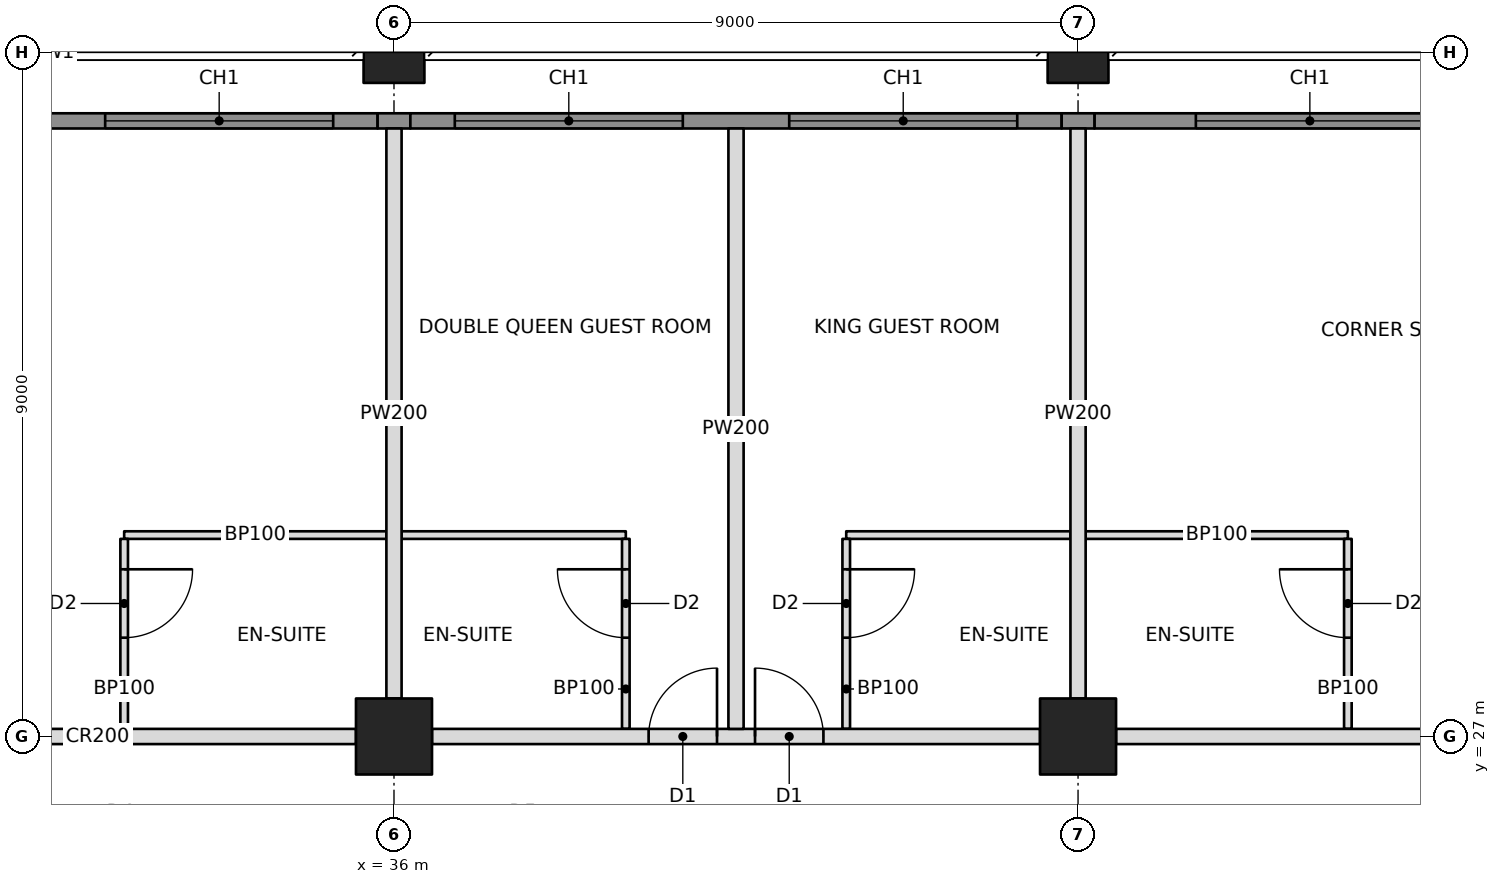
"""IFC4 building model, lengths in metres.
Left out: names, types, materials, properties, quantities, classifications, styles, units other than length and angle.
Written with IfcOpenShell. Run it as: python <this file> out.ifc"""

import sys

from ifc_helpers import new_model, si_unit, direction, frame, frame_2d, origin, origin_2d, place, context, subcontext, project, spatial, rectangle, hollow_rectangle, extrude, element, fill, save


model = new_model("IFC4")
c1 = context("Model", 3, precision=1e-05, world=origin(), true_north=direction((0.0, 1.0)))
c2 = subcontext(c1, "Body", "Model", "MODEL_VIEW")
j1 = project(units=[si_unit("LENGTHUNIT", "METRE"), si_unit("PLANEANGLEUNIT", "RADIAN")], contexts=[c1])
p1 = place(None, origin())
s1 = spatial("IfcSite", under=j1, at=p1, CompositionType="ELEMENT")
p2 = place(p1, origin())
s2 = spatial("IfcBuilding", under=s1, at=p2, CompositionType="ELEMENT")
p3 = place(p2, frame((0.0, 0.0, 85.8)))
s3 = spatial("IfcBuildingStorey", under=s2, at=p3, CompositionType="ELEMENT", Elevation=85.8)
p4 = place(p3, frame((36.0, 27.0, 0.0), z_axis=(0.0, 0.0, 1.0), x_axis=(1.0, 0.0, 0.0)))
e1 = element("IfcColumn", 1, at=p4, inside=s3, PredefinedType="COLUMN", context=c2, shape_type="SweptSolid", body=[
    extrude(hollow_rectangle(XDim=1.0, YDim=1.0, WallThickness=0.1, at=origin_2d()), origin(), (0.0, 0.0, 1.0), 3.4),
])
p5 = place(p3, frame((36.0, 36.0, 0.0), z_axis=(0.0, 0.0, 1.0), x_axis=(1.0, 0.0, 0.0)))
e2 = element("IfcColumn", 2, at=p5, inside=s3, PredefinedType="COLUMN", context=c2, shape_type="SweptSolid", body=[
    extrude(hollow_rectangle(XDim=0.8, YDim=0.8, WallThickness=0.07, at=origin_2d()), origin(), (0.0, 0.0, 1.0), 3.4),
])
p6 = place(p3, frame((45.0, 27.0, 0.0), z_axis=(0.0, 0.0, 1.0), x_axis=(0.0, 1.0, 0.0)))
e3 = element("IfcColumn", 3, at=p6, inside=s3, PredefinedType="COLUMN", context=c2, shape_type="SweptSolid", body=[
    extrude(hollow_rectangle(XDim=1.0, YDim=1.0, WallThickness=0.1, at=origin_2d()), origin(), (0.0, 0.0, 1.0), 3.4),
])
p7 = place(p3, frame((45.0, 36.0, 0.0), z_axis=(0.0, 0.0, 1.0), x_axis=(1.0, 0.0, 0.0)))
e4 = element("IfcColumn", 4, at=p7, inside=s3, PredefinedType="COLUMN", context=c2, shape_type="SweptSolid", body=[
    extrude(hollow_rectangle(XDim=0.8, YDim=0.8, WallThickness=0.07, at=origin_2d()), origin(), (0.0, 0.0, 1.0), 3.4),
])
p8 = place(p3, frame((27.5, 27.0, 0.0), z_axis=(0.0, 0.0, 1.0), x_axis=(1.0, 0.0, 0.0)))
e5 = element("IfcWall", 5, at=p8, inside=s3, PredefinedType="PARTITIONING", context=c2, shape_type="SweptSolid", body=[
    extrude(rectangle(XDim=8.0, YDim=0.2, at=frame_2d((4.0, 0.0))), origin(), (0.0, 0.0, 1.0), 2.21),
])
p9 = place(p8, frame((0.15, 0.0, 0.0)))
e6 = element("IfcOpeningElement", 6, at=p9, cuts=e5, PredefinedType="OPENING", context=c2, shape_type="SweptSolid", body=[
    extrude(rectangle(XDim=0.9, YDim=2.1, at=frame_2d((0.45, 1.05))), frame((0.0, 0.11, 0.0), z_axis=(0.0, -1.0, 0.0), x_axis=(1.0, 0.0, 0.0)), (0.0, 0.0, 1.0), 0.22),
])
p10 = place(p3, frame((36.5, 27.0, 0.0), z_axis=(0.0, 0.0, 1.0), x_axis=(1.0, 0.0, 0.0)))
e7 = element("IfcWall", 7, at=p10, inside=s3, PredefinedType="PARTITIONING", context=c2, shape_type="SweptSolid", body=[
    extrude(rectangle(XDim=8.0, YDim=0.2, at=frame_2d((4.0, 0.0))), origin(), (0.0, 0.0, 1.0), 2.21),
])
p11 = place(p10, frame((2.85, 0.0, 0.0)))
e8 = element("IfcOpeningElement", 8, at=p11, cuts=e7, PredefinedType="OPENING", context=c2, shape_type="SweptSolid", body=[
    extrude(rectangle(XDim=0.9, YDim=2.1, at=frame_2d((0.45, 1.05))), frame((0.0, 0.11, 0.0), z_axis=(0.0, -1.0, 0.0), x_axis=(1.0, 0.0, 0.0)), (0.0, 0.0, 1.0), 0.22),
])
p12 = place(p10, frame((4.25, 0.0, 0.0)))
e9 = element("IfcOpeningElement", 9, at=p12, cuts=e7, PredefinedType="OPENING", context=c2, shape_type="SweptSolid", body=[
    extrude(rectangle(XDim=0.9, YDim=2.1, at=frame_2d((0.45, 1.05))), frame((0.0, 0.11, 0.0), z_axis=(0.0, -1.0, 0.0), x_axis=(1.0, 0.0, 0.0)), (0.0, 0.0, 1.0), 0.22),
])
p13 = place(p3, frame((45.5, 27.0, 0.0), z_axis=(0.0, 0.0, 1.0), x_axis=(1.0, 0.0, 0.0)))
e10 = element("IfcWall", 10, at=p13, inside=s3, PredefinedType="PARTITIONING", context=c2, shape_type="SweptSolid", body=[
    extrude(rectangle(XDim=7.5, YDim=0.2, at=frame_2d((3.75, 0.0))), origin(), (0.0, 0.0, 1.0), 2.21),
])
p14 = place(p13, frame((6.35, 0.0, 0.0)))
e11 = element("IfcOpeningElement", 11, at=p14, cuts=e10, PredefinedType="OPENING", context=c2, shape_type="SweptSolid", body=[
    extrude(rectangle(XDim=0.9, YDim=2.1, at=frame_2d((0.45, 1.05))), frame((0.0, 0.11, 0.0), z_axis=(0.0, -1.0, 0.0), x_axis=(1.0, 0.0, 0.0)), (0.0, 0.0, 1.0), 0.22),
])
p15 = place(p3, frame((36.0, 27.5, 0.0), z_axis=(0.0, 0.0, 1.0), x_axis=(0.0, 1.0, 0.0)))
e12 = element("IfcWall", 12, at=p15, inside=s3, PredefinedType="PARTITIONING", context=c2, shape_type="SweptSolid", body=[
    extrude(rectangle(XDim=7.5, YDim=0.2, at=frame_2d((3.75, 0.0))), origin(), (0.0, 0.0, 1.0), 2.21),
])
p16 = place(p3, frame((40.5, 27.1, 0.0), z_axis=(0.0, 0.0, 1.0), x_axis=(0.0, 1.0, 0.0)))
e13 = element("IfcWall", 13, at=p16, inside=s3, PredefinedType="PARTITIONING", context=c2, shape_type="SweptSolid", body=[
    extrude(rectangle(XDim=7.9, YDim=0.2, at=frame_2d((3.95, 0.0))), origin(), (0.0, 0.0, 1.0), 2.21),
])
p17 = place(p3, frame((45.0, 27.5, 0.0), z_axis=(0.0, 0.0, 1.0), x_axis=(0.0, 1.0, 0.0)))
e14 = element("IfcWall", 14, at=p17, inside=s3, PredefinedType="PARTITIONING", context=c2, shape_type="SweptSolid", body=[
    extrude(rectangle(XDim=7.5, YDim=0.2, at=frame_2d((3.75, 0.0))), origin(), (0.0, 0.0, 1.0), 2.21),
])
p18 = place(p3, frame((32.45, 29.65, 0.0), z_axis=(0.0, 0.0, 1.0), x_axis=(1.0, 0.0, 0.0)))
e15 = element("IfcWall", 15, at=p18, inside=s3, PredefinedType="PARTITIONING", context=c2, shape_type="SweptSolid", body=[
    extrude(rectangle(XDim=3.45, YDim=0.1, at=frame_2d((1.725, 0.0))), origin(), (0.0, 0.0, 1.0), 2.21),
])
p19 = place(p3, frame((32.45, 27.1, 0.0), z_axis=(0.0, 0.0, 1.0), x_axis=(0.0, 1.0, 0.0)))
e16 = element("IfcWall", 16, at=p19, inside=s3, PredefinedType="PARTITIONING", context=c2, shape_type="SweptSolid", body=[
    extrude(rectangle(XDim=2.5, YDim=0.1, at=frame_2d((1.25, 0.0))), origin(), (0.0, 0.0, 1.0), 2.21),
])
p20 = place(p19, frame((1.2, 0.0, 0.0)))
e17 = element("IfcOpeningElement", 17, at=p20, cuts=e16, PredefinedType="OPENING", context=c2, shape_type="SweptSolid", body=[
    extrude(rectangle(XDim=0.9, YDim=2.1, at=frame_2d((0.45, 1.05))), frame((0.0, 0.06, 0.0), z_axis=(0.0, -1.0, 0.0), x_axis=(1.0, 0.0, 0.0)), (0.0, 0.0, 1.0), 0.12),
])
p21 = place(p3, frame((36.1, 29.65, 0.0), z_axis=(0.0, 0.0, 1.0), x_axis=(1.0, 0.0, 0.0)))
e18 = element("IfcWall", 18, at=p21, inside=s3, PredefinedType="PARTITIONING", context=c2, shape_type="SweptSolid", body=[
    extrude(rectangle(XDim=2.95, YDim=0.1, at=frame_2d((1.475, 0.0))), origin(), (0.0, 0.0, 1.0), 2.21),
])
p22 = place(p3, frame((39.05, 27.1, 0.0), z_axis=(0.0, 0.0, 1.0), x_axis=(0.0, 1.0, 0.0)))
e19 = element("IfcWall", 19, at=p22, inside=s3, PredefinedType="PARTITIONING", context=c2, shape_type="SweptSolid", body=[
    extrude(rectangle(XDim=2.5, YDim=0.1, at=frame_2d((1.25, 0.0))), origin(), (0.0, 0.0, 1.0), 2.21),
])
p23 = place(p22, frame((1.2, 0.0, 0.0)))
e20 = element("IfcOpeningElement", 20, at=p23, cuts=e19, PredefinedType="OPENING", context=c2, shape_type="SweptSolid", body=[
    extrude(rectangle(XDim=0.9, YDim=2.1, at=frame_2d((0.45, 1.05))), frame((0.0, 0.06, 0.0), z_axis=(0.0, -1.0, 0.0), x_axis=(1.0, 0.0, 0.0)), (0.0, 0.0, 1.0), 0.12),
])
p24 = place(p3, frame((41.95, 29.65, 0.0), z_axis=(0.0, 0.0, 1.0), x_axis=(1.0, 0.0, 0.0)))
e21 = element("IfcWall", 21, at=p24, inside=s3, PredefinedType="PARTITIONING", context=c2, shape_type="SweptSolid", body=[
    extrude(rectangle(XDim=2.95, YDim=0.1, at=frame_2d((1.475, 0.0))), origin(), (0.0, 0.0, 1.0), 2.21),
])
p25 = place(p3, frame((41.95, 27.1, 0.0), z_axis=(0.0, 0.0, 1.0), x_axis=(0.0, 1.0, 0.0)))
e22 = element("IfcWall", 22, at=p25, inside=s3, PredefinedType="PARTITIONING", context=c2, shape_type="SweptSolid", body=[
    extrude(rectangle(XDim=2.5, YDim=0.1, at=frame_2d((1.25, 0.0))), origin(), (0.0, 0.0, 1.0), 2.21),
])
p26 = place(p25, frame((1.2, 0.0, 0.0)))
e23 = element("IfcOpeningElement", 23, at=p26, cuts=e22, PredefinedType="OPENING", context=c2, shape_type="SweptSolid", body=[
    extrude(rectangle(XDim=0.9, YDim=2.1, at=frame_2d((0.45, 1.05))), frame((0.0, 0.06, 0.0), z_axis=(0.0, -1.0, 0.0), x_axis=(1.0, 0.0, 0.0)), (0.0, 0.0, 1.0), 0.12),
])
p27 = place(p3, frame((45.1, 29.65, 0.0), z_axis=(0.0, 0.0, 1.0), x_axis=(1.0, 0.0, 0.0)))
e24 = element("IfcWall", 24, at=p27, inside=s3, PredefinedType="PARTITIONING", context=c2, shape_type="SweptSolid", body=[
    extrude(rectangle(XDim=3.45, YDim=0.1, at=frame_2d((1.725, 0.0))), origin(), (0.0, 0.0, 1.0), 2.21),
])
p28 = place(p3, frame((48.55, 27.1, 0.0), z_axis=(0.0, 0.0, 1.0), x_axis=(0.0, 1.0, 0.0)))
e25 = element("IfcWall", 25, at=p28, inside=s3, PredefinedType="PARTITIONING", context=c2, shape_type="SweptSolid", body=[
    extrude(rectangle(XDim=2.5, YDim=0.1, at=frame_2d((1.25, 0.0))), origin(), (0.0, 0.0, 1.0), 2.21),
])
p29 = place(p28, frame((1.2, 0.0, 0.0)))
e26 = element("IfcOpeningElement", 26, at=p29, cuts=e25, PredefinedType="OPENING", context=c2, shape_type="SweptSolid", body=[
    extrude(rectangle(XDim=0.9, YDim=2.1, at=frame_2d((0.45, 1.05))), frame((0.0, 0.06, 0.0), z_axis=(0.0, -1.0, 0.0), x_axis=(1.0, 0.0, 0.0)), (0.0, 0.0, 1.0), 0.12),
])
p30 = place(p3, frame((27.214, 35.1, 0.0), z_axis=(0.0, 0.0, 1.0), x_axis=(1.0, 0.0, 0.0)))
e27 = element("IfcWall", 27, at=p30, inside=s3, PredefinedType="SOLIDWALL", context=c2, shape_type="SweptSolid", body=[
    extrude(rectangle(XDim=8.571, YDim=0.2, at=frame_2d((4.285, 0.0))), origin(), (0.0, 0.0, 1.0), 3.15),
])
p31 = place(p30, frame((0.586, 0.0, 0.6)))
e28 = element("IfcOpeningElement", 28, at=p31, cuts=e27, PredefinedType="OPENING", context=c2, shape_type="SweptSolid", body=[
    extrude(rectangle(XDim=3.0, YDim=2.2, at=frame_2d((1.5, 1.1))), frame((0.0, 0.11, 0.0), z_axis=(0.0, -1.0, 0.0), x_axis=(1.0, 0.0, 0.0)), (0.0, 0.0, 1.0), 0.22),
])
p32 = place(p30, frame((4.986, 0.0, 0.6)))
e29 = element("IfcOpeningElement", 29, at=p32, cuts=e27, PredefinedType="OPENING", context=c2, shape_type="SweptSolid", body=[
    extrude(rectangle(XDim=3.0, YDim=2.2, at=frame_2d((1.5, 1.1))), frame((0.0, 0.11, 0.0), z_axis=(0.0, -1.0, 0.0), x_axis=(1.0, 0.0, 0.0)), (0.0, 0.0, 1.0), 0.22),
])
p33 = place(p3, frame((35.785, 35.1, 0.0), z_axis=(0.0, 0.0, 1.0), x_axis=(1.0, 0.0, 0.0)))
e30 = element("IfcWall", 30, at=p33, inside=s3, PredefinedType="SOLIDWALL", context=c2, shape_type="SweptSolid", body=[
    extrude(rectangle(XDim=0.431, YDim=0.2, at=frame_2d((0.215, 0.0))), origin(), (0.0, 0.0, 1.0), 2.21),
])
p34 = place(p3, frame((36.215, 35.1, 0.0), z_axis=(0.0, 0.0, 1.0), x_axis=(1.0, 0.0, 0.0)))
e31 = element("IfcWall", 31, at=p34, inside=s3, PredefinedType="SOLIDWALL", context=c2, shape_type="SweptSolid", body=[
    extrude(rectangle(XDim=8.569, YDim=0.2, at=frame_2d((4.285, 0.0))), origin(), (0.0, 0.0, 1.0), 3.15),
])
p35 = place(p34, frame((0.585, 0.0, 0.6)))
e32 = element("IfcOpeningElement", 32, at=p35, cuts=e31, PredefinedType="OPENING", context=c2, shape_type="SweptSolid", body=[
    extrude(rectangle(XDim=3.0, YDim=2.2, at=frame_2d((1.5, 1.1))), frame((0.0, 0.11, 0.0), z_axis=(0.0, -1.0, 0.0), x_axis=(1.0, 0.0, 0.0)), (0.0, 0.0, 1.0), 0.22),
])
p36 = place(p34, frame((4.985, 0.0, 0.6)))
e33 = element("IfcOpeningElement", 33, at=p36, cuts=e31, PredefinedType="OPENING", context=c2, shape_type="SweptSolid", body=[
    extrude(rectangle(XDim=3.0, YDim=2.2, at=frame_2d((1.5, 1.1))), frame((0.0, 0.11, 0.0), z_axis=(0.0, -1.0, 0.0), x_axis=(1.0, 0.0, 0.0)), (0.0, 0.0, 1.0), 0.22),
])
p37 = place(p3, frame((44.785, 35.1, 0.0), z_axis=(0.0, 0.0, 1.0), x_axis=(1.0, 0.0, 0.0)))
e34 = element("IfcWall", 34, at=p37, inside=s3, PredefinedType="SOLIDWALL", context=c2, shape_type="SweptSolid", body=[
    extrude(rectangle(XDim=0.431, YDim=0.2, at=frame_2d((0.215, 0.0))), origin(), (0.0, 0.0, 1.0), 2.21),
])
p38 = place(p3, frame((45.215, 35.1, 0.0), z_axis=(0.0, 0.0, 1.0), x_axis=(1.0, 0.0, 0.0)))
e35 = element("IfcWall", 35, at=p38, inside=s3, PredefinedType="SOLIDWALL", context=c2, shape_type="SweptSolid", body=[
    extrude(rectangle(XDim=5.785, YDim=0.2, at=frame_2d((2.892, 0.0))), origin(), (0.0, 0.0, 1.0), 3.15),
])
p39 = place(p38, frame((1.335, 0.0, 0.6)))
e36 = element("IfcOpeningElement", 36, at=p39, cuts=e35, PredefinedType="OPENING", context=c2, shape_type="SweptSolid", body=[
    extrude(rectangle(XDim=3.0, YDim=2.2, at=frame_2d((1.5, 1.1))), frame((0.0, 0.11, 0.0), z_axis=(0.0, -1.0, 0.0), x_axis=(1.0, 0.0, 0.0)), (0.0, 0.0, 1.0), 0.22),
])
p40 = place(p32, origin())
e37 = element("IfcWindow", 37, at=p40, inside=s3, PartitioningType="TRIPLE_PANEL_VERTICAL", PredefinedType="WINDOW", context=c2, shape_type="SweptSolid", body=[
    extrude(rectangle(XDim=3.0, YDim=2.2, at=frame_2d((1.5, 1.1))), frame((0.0, 0.03, 0.0), z_axis=(0.0, -1.0, 0.0), x_axis=(1.0, 0.0, 0.0)), (0.0, 0.0, 1.0), 0.06),
])
fill(e29, e37)
p41 = place(p35, origin())
e38 = element("IfcWindow", 38, at=p41, inside=s3, PartitioningType="TRIPLE_PANEL_VERTICAL", PredefinedType="WINDOW", context=c2, shape_type="SweptSolid", body=[
    extrude(rectangle(XDim=3.0, YDim=2.2, at=frame_2d((1.5, 1.1))), frame((0.0, 0.03, 0.0), z_axis=(0.0, -1.0, 0.0), x_axis=(1.0, 0.0, 0.0)), (0.0, 0.0, 1.0), 0.06),
])
fill(e32, e38)
p42 = place(p36, origin())
e39 = element("IfcWindow", 39, at=p42, inside=s3, PartitioningType="TRIPLE_PANEL_VERTICAL", PredefinedType="WINDOW", context=c2, shape_type="SweptSolid", body=[
    extrude(rectangle(XDim=3.0, YDim=2.2, at=frame_2d((1.5, 1.1))), frame((0.0, 0.03, 0.0), z_axis=(0.0, -1.0, 0.0), x_axis=(1.0, 0.0, 0.0)), (0.0, 0.0, 1.0), 0.06),
])
fill(e33, e39)
p43 = place(p39, origin())
e40 = element("IfcWindow", 40, at=p43, inside=s3, PartitioningType="TRIPLE_PANEL_VERTICAL", PredefinedType="WINDOW", context=c2, shape_type="SweptSolid", body=[
    extrude(rectangle(XDim=3.0, YDim=2.2, at=frame_2d((1.5, 1.1))), frame((0.0, 0.03, 0.0), z_axis=(0.0, -1.0, 0.0), x_axis=(1.0, 0.0, 0.0)), (0.0, 0.0, 1.0), 0.06),
])
fill(e36, e40)
p44 = place(p20, frame((0.9, 0.0, 0.0), z_axis=(0.0, 0.0, 1.0), x_axis=(-1.0, 0.0, 0.0)))
e41 = element("IfcDoor", 41, at=p44, inside=s3, OperationType="SINGLE_SWING_LEFT", PredefinedType="DOOR", context=c2, shape_type="SweptSolid", body=[
    extrude(rectangle(XDim=0.9, YDim=2.1, at=frame_2d((0.45, 1.05))), frame((0.0, 0.025, 0.0), z_axis=(0.0, -1.0, 0.0), x_axis=(1.0, 0.0, 0.0)), (0.0, 0.0, 1.0), 0.05),
])
fill(e17, e41)
p45 = place(p23, origin())
e42 = element("IfcDoor", 42, at=p45, inside=s3, OperationType="SINGLE_SWING_RIGHT", PredefinedType="DOOR", context=c2, shape_type="SweptSolid", body=[
    extrude(rectangle(XDim=0.9, YDim=2.1, at=frame_2d((0.45, 1.05))), frame((0.0, 0.025, 0.0), z_axis=(0.0, -1.0, 0.0), x_axis=(1.0, 0.0, 0.0)), (0.0, 0.0, 1.0), 0.05),
])
fill(e20, e42)
p46 = place(p11, origin())
e43 = element("IfcDoor", 43, at=p46, inside=s3, OperationType="SINGLE_SWING_RIGHT", PredefinedType="DOOR", context=c2, shape_type="SweptSolid", body=[
    extrude(rectangle(XDim=0.9, YDim=2.1, at=frame_2d((0.45, 1.05))), frame((0.0, 0.025, 0.0), z_axis=(0.0, -1.0, 0.0), x_axis=(1.0, 0.0, 0.0)), (0.0, 0.0, 1.0), 0.05),
])
fill(e8, e43)
p47 = place(p26, frame((0.9, 0.0, 0.0), z_axis=(0.0, 0.0, 1.0), x_axis=(-1.0, 0.0, 0.0)))
e44 = element("IfcDoor", 44, at=p47, inside=s3, OperationType="SINGLE_SWING_LEFT", PredefinedType="DOOR", context=c2, shape_type="SweptSolid", body=[
    extrude(rectangle(XDim=0.9, YDim=2.1, at=frame_2d((0.45, 1.05))), frame((0.0, 0.025, 0.0), z_axis=(0.0, -1.0, 0.0), x_axis=(1.0, 0.0, 0.0)), (0.0, 0.0, 1.0), 0.05),
])
fill(e23, e44)
p48 = place(p12, origin())
e45 = element("IfcDoor", 45, at=p48, inside=s3, OperationType="SINGLE_SWING_LEFT", PredefinedType="DOOR", context=c2, shape_type="SweptSolid", body=[
    extrude(rectangle(XDim=0.9, YDim=2.1, at=frame_2d((0.45, 1.05))), frame((0.0, 0.025, 0.0), z_axis=(0.0, -1.0, 0.0), x_axis=(1.0, 0.0, 0.0)), (0.0, 0.0, 1.0), 0.05),
])
fill(e9, e45)
p49 = place(p29, origin())
e46 = element("IfcDoor", 46, at=p49, inside=s3, OperationType="SINGLE_SWING_RIGHT", PredefinedType="DOOR", context=c2, shape_type="SweptSolid", body=[
    extrude(rectangle(XDim=0.9, YDim=2.1, at=frame_2d((0.45, 1.05))), frame((0.0, 0.025, 0.0), z_axis=(0.0, -1.0, 0.0), x_axis=(1.0, 0.0, 0.0)), (0.0, 0.0, 1.0), 0.05),
])
fill(e26, e46)
save(model, sys.argv[1])
